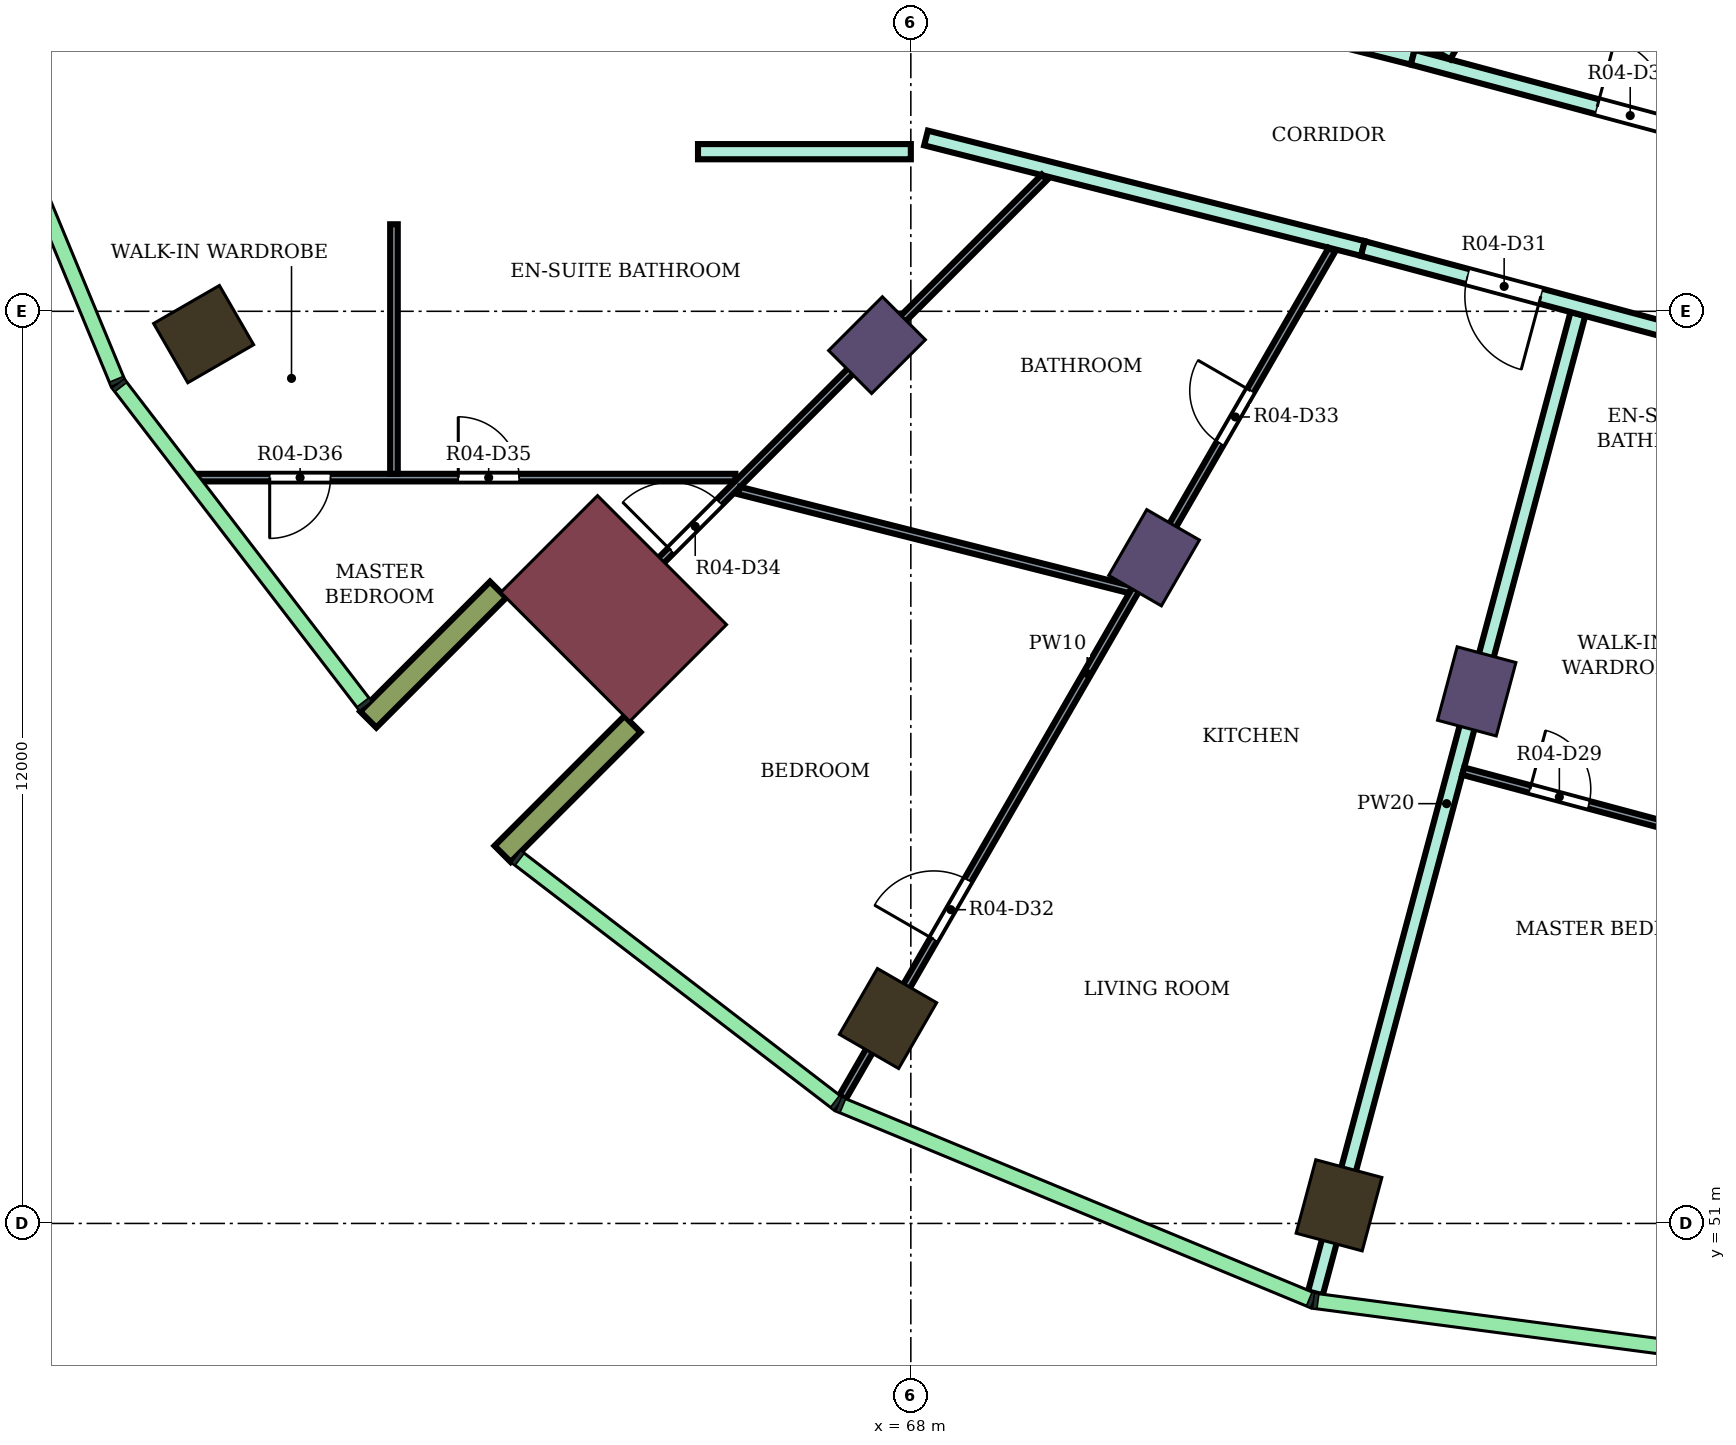
"""IFC4 building model, lengths in metres.
Left out: names, types, materials, properties, quantities, classifications, styles, units other than length and angle.
Written with IfcOpenShell. Run it as: python <this file> out.ifc"""

import sys

from ifc_helpers import new_model, si_unit, direction, frame, frame_2d, origin, origin_2d, place, context, subcontext, project, spatial, rectangle, extrude, element, fill, save


model = new_model("IFC4")
c1 = context("Model", 3, precision=1e-05, world=origin(), true_north=direction((0.0, 1.0)))
c2 = subcontext(c1, "Body", "Model", "MODEL_VIEW")
j1 = project(units=[si_unit("LENGTHUNIT", "METRE"), si_unit("PLANEANGLEUNIT", "RADIAN")], contexts=[c1])
p1 = place(None, origin())
s1 = spatial("IfcSite", under=j1, at=p1, CompositionType="ELEMENT")
p2 = place(p1, origin())
s2 = spatial("IfcBuilding", under=s1, at=p2, CompositionType="ELEMENT")
p3 = place(p2, frame((0.0, 0.0, 194.6)))
s3 = spatial("IfcBuildingStorey", under=s2, at=p3, CompositionType="ELEMENT", Elevation=194.6)
for number, where, z_axis, x_axis in (
    (1, (58.696, 62.7, 0.0), (0.0, 0.0, 1.0), (-0.866, -0.5, 0.0)),
    (2, (67.7, 53.696, 0.0), (0.0, 0.0, 1.0), (-0.5, -0.866, 0.0)),
    (3, (73.633, 51.238, 0.0), (0.0, 0.0, 1.0), (-0.259, -0.966, 0.0)),
):
    element("IfcColumn", number, at=place(p3, frame(where, z_axis=z_axis, x_axis=x_axis)), inside=s3, PredefinedType="COLUMN", context=c2, shape_type="SweptSolid", body=[
        extrude(rectangle(XDim=1.0, YDim=0.9, at=origin_2d()), origin(), (0.0, 0.0, 1.0), 4.1),
    ])
for number, where, z_axis, x_axis in (
    (4, (67.555, 62.555, 0.0), (0.0, 0.0, 1.0), (-0.707, -0.707, 0.0)),
    (5, (71.2, 59.758, 0.0), (0.0, 0.0, 1.0), (-0.5, -0.866, 0.0)),
    (6, (75.445, 58.0, 0.0), (0.0, 0.0, 1.0), (-0.259, -0.966, 0.0)),
):
    element("IfcColumn", number, at=place(p3, frame(where, z_axis=z_axis, x_axis=x_axis)), inside=s3, PredefinedType="COLUMN", context=c2, shape_type="SweptSolid", body=[
        extrude(rectangle(XDim=1.0, YDim=0.8, at=origin_2d()), origin(), (0.0, 0.0, 1.0), 4.1),
    ])
p4 = place(p3, frame((64.09, 59.09, 0.0), z_axis=(0.0, 0.0, 1.0), x_axis=(-0.707106781187, -0.707106781187, 0.0)))
e7 = element("IfcColumn", 7, at=p4, inside=s3, PredefinedType="COLUMN", context=c2, shape_type="SweptSolid", body=[
    extrude(rectangle(XDim=1.8, YDim=2.4, at=origin_2d()), origin(), (0.0, 0.0, 1.0), 4.1),
])
for number, where, z_axis, x_axis in (
    (8, (62.57, 59.338, 0.0), (0.0, 0.0, 1.0), (-0.707, -0.707, 0.0)),
    (9, (64.338, 57.57, 0.0), (0.0, 0.0, 1.0), (-0.707, -0.707, 0.0)),
):
    element("IfcWall", number, at=place(p3, frame(where, z_axis=z_axis, x_axis=x_axis)), inside=s3, PredefinedType="NOTDEFINED", context=c2, shape_type="SweptSolid", body=[
        extrude(rectangle(XDim=2.416, YDim=0.3, at=frame_2d((1.208, 0.0))), origin(), (0.0, 0.0, 1.0), 4.1),
    ])
p5 = place(p3, frame((65.2, 65.1, 0.0), z_axis=(0.0, 0.0, 1.0), x_axis=(1.0, 0.0, 0.0)))
e10 = element("IfcWall", 10, at=p5, inside=s3, PredefinedType="PARTITIONING", context=c2, shape_type="SweptSolid", body=[
    extrude(rectangle(XDim=2.8, YDim=0.2, at=frame_2d((1.4, 0.0))), origin(), (0.0, 0.0, 1.0), 3.65),
])
p6 = place(p3, frame((68.2, 65.28, 0.0), z_axis=(0.0, 0.0, 1.0), x_axis=(0.969450596516, -0.245286650503, 0.0)))
e11 = element("IfcWall", 11, at=p6, inside=s3, PredefinedType="PARTITIONING", context=c2, shape_type="SweptSolid", body=[
    extrude(rectangle(XDim=5.928, YDim=0.2, at=frame_2d((2.964, 0.0))), origin(), (0.0, 0.0, 1.0), 3.65),
])
p7 = place(p3, frame((72.1, 66.975, 0.0), z_axis=(0.0, 0.0, 1.0), x_axis=(0.969471314457, -0.245204752086, 0.0)))
e12 = element("IfcWall", 12, at=p7, inside=s3, PredefinedType="PARTITIONING", context=c2, shape_type="SweptSolid", body=[
    extrude(rectangle(XDim=2.582, YDim=0.2, at=frame_2d((1.291, 0.0))), origin(), (0.0, 0.0, 1.0), 3.65),
])
p8 = place(p7, frame((0.841, 0.0, 0.0)))
e13 = element("IfcOpeningElement", 13, at=p8, cuts=e12, PredefinedType="OPENING", context=c2, shape_type="SweptSolid", body=[
    extrude(rectangle(XDim=0.9, YDim=2.1, at=frame_2d((0.45, 1.05))), frame((0.0, 0.11, 0.0), z_axis=(0.0, -1.0, 0.0), x_axis=(1.0, 0.0, 0.0)), (0.0, 0.0, 1.0), 0.22),
])
p9 = place(p3, frame((73.323, 50.081, 0.0), z_axis=(0.0, 0.0, 1.0), x_axis=(0.258888262922, 0.965907276772, 0.0)))
e14 = element("IfcWall", 14, at=p9, inside=s3, PredefinedType="PARTITIONING", context=c2, shape_type="SweptSolid", body=[
    extrude(rectangle(XDim=13.338, YDim=0.2, at=frame_2d((6.669, 0.0))), origin(), (0.0, 0.0, 1.0), 3.65),
])
p10 = place(p3, frame((73.947, 63.826, 0.0), z_axis=(0.0, 0.0, 1.0), x_axis=(0.965908253407, -0.258884619088, 0.0)))
e15 = element("IfcWall", 15, at=p10, inside=s3, PredefinedType="PARTITIONING", context=c2, shape_type="SweptSolid", body=[
    extrude(rectangle(XDim=6.217, YDim=0.2, at=frame_2d((3.108, 0.0))), origin(), (0.0, 0.0, 1.0), 3.65),
])
p11 = place(p10, frame((1.424, 0.0, 0.0)))
e16 = element("IfcOpeningElement", 16, at=p11, cuts=e15, PredefinedType="OPENING", context=c2, shape_type="SweptSolid", body=[
    extrude(rectangle(XDim=1.0, YDim=2.1, at=frame_2d((0.5, 1.05))), frame((0.0, 0.11, 0.0), z_axis=(0.0, -1.0, 0.0), x_axis=(1.0, 0.0, 0.0)), (0.0, 0.0, 1.0), 0.22),
])
p12 = place(p3, frame((74.603, 66.342, 0.0), z_axis=(0.0, 0.0, 1.0), x_axis=(0.965920893652, -0.258837453254, 0.0)))
e17 = element("IfcWall", 17, at=p12, inside=s3, PredefinedType="PARTITIONING", context=c2, shape_type="SweptSolid", body=[
    extrude(rectangle(XDim=5.458, YDim=0.2, at=frame_2d((2.729, 0.0))), origin(), (0.0, 0.0, 1.0), 3.65),
])
p13 = place(p12, frame((2.512, 0.0, 0.0)))
e18 = element("IfcOpeningElement", 18, at=p13, cuts=e17, PredefinedType="OPENING", context=c2, shape_type="SweptSolid", body=[
    extrude(rectangle(XDim=0.9, YDim=2.1, at=frame_2d((0.45, 1.05))), frame((0.0, 0.11, 0.0), z_axis=(0.0, -1.0, 0.0), x_axis=(1.0, 0.0, 0.0)), (0.0, 0.0, 1.0), 0.22),
])
p14 = place(p3, frame((75.01, 66.364, 0.0), z_axis=(0.0, 0.0, 1.0), x_axis=(0.500097042406, 0.865969369075, 0.0)))
e19 = element("IfcWall", 19, at=p14, inside=s3, PredefinedType="PARTITIONING", context=c2, shape_type="SweptSolid", body=[
    extrude(rectangle(XDim=2.275, YDim=0.2, at=frame_2d((1.138, 0.0))), origin(), (0.0, 0.0, 1.0), 3.65),
])
p15 = place(p3, frame((58.6, 60.812, 0.0), z_axis=(0.0, 0.0, 1.0), x_axis=(1.0, 0.0, 0.0)))
e20 = element("IfcWall", 20, at=p15, inside=s3, PredefinedType="PARTITIONING", context=c2, shape_type="SweptSolid", body=[
    extrude(rectangle(XDim=7.092, YDim=0.1, at=frame_2d((3.546, 0.0))), origin(), (0.0, 0.0, 1.0), 3.65),
])
p16 = place(p15, frame((3.446, 0.0, 0.0)))
e21 = element("IfcOpeningElement", 21, at=p16, cuts=e20, PredefinedType="OPENING", context=c2, shape_type="SweptSolid", body=[
    extrude(rectangle(XDim=0.8, YDim=2.1, at=frame_2d((0.4, 1.05))), frame((0.0, 0.06, 0.0), z_axis=(0.0, -1.0, 0.0), x_axis=(1.0, 0.0, 0.0)), (0.0, 0.0, 1.0), 0.12),
])
p17 = place(p15, frame((0.965, 0.0, 0.0)))
e22 = element("IfcOpeningElement", 22, at=p17, cuts=e20, PredefinedType="OPENING", context=c2, shape_type="SweptSolid", body=[
    extrude(rectangle(XDim=0.8, YDim=2.1, at=frame_2d((0.4, 1.05))), frame((0.0, 0.06, 0.0), z_axis=(0.0, -1.0, 0.0), x_axis=(1.0, 0.0, 0.0)), (0.0, 0.0, 1.0), 0.12),
])
p18 = place(p3, frame((61.2, 60.862, 0.0), z_axis=(0.0, 0.0, 1.0), x_axis=(0.0, 1.0, 0.0)))
e23 = element("IfcWall", 23, at=p18, inside=s3, PredefinedType="PARTITIONING", context=c2, shape_type="SweptSolid", body=[
    extrude(rectangle(XDim=3.283, YDim=0.1, at=frame_2d((1.642, 0.0))), origin(), (0.0, 0.0, 1.0), 3.65),
])
p19 = place(p3, frame((63.592, 58.6, 0.0), z_axis=(0.0, 0.0, 1.0), x_axis=(0.707260766325, 0.706952762508, 0.0)))
e24 = element("IfcWall", 24, at=p19, inside=s3, PredefinedType="PARTITIONING", context=c2, shape_type="SweptSolid", body=[
    extrude(rectangle(XDim=8.719, YDim=0.1, at=frame_2d((4.36, 0.0))), origin(), (0.0, 0.0, 1.0), 3.65),
])
p20 = place(p19, frame((1.772, 0.0, 0.0)))
e25 = element("IfcOpeningElement", 25, at=p20, cuts=e24, PredefinedType="OPENING", context=c2, shape_type="SweptSolid", body=[
    extrude(rectangle(XDim=0.9, YDim=2.1, at=frame_2d((0.45, 1.05))), frame((0.0, 0.06, 0.0), z_axis=(0.0, -1.0, 0.0), x_axis=(1.0, 0.0, 0.0)), (0.0, 0.0, 1.0), 0.12),
])
p21 = place(p3, frame((65.74, 60.642, 0.0), z_axis=(0.0, 0.0, 1.0), x_axis=(0.969435742918, -0.245345349156, 0.0)))
e26 = element("IfcWall", 26, at=p21, inside=s3, PredefinedType="PARTITIONING", context=c2, shape_type="SweptSolid", body=[
    extrude(rectangle(XDim=5.314, YDim=0.1, at=frame_2d((2.657, 0.0))), origin(), (0.0, 0.0, 1.0), 3.65),
])
p22 = place(p3, frame((67.101, 52.659, 0.0), z_axis=(0.0, 0.0, 1.0), x_axis=(0.500035926033, 0.866004660886, 0.0)))
e27 = element("IfcWall", 27, at=p22, inside=s3, PredefinedType="PARTITIONING", context=c2, shape_type="SweptSolid", body=[
    extrude(rectangle(XDim=12.876, YDim=0.1, at=frame_2d((6.438, 0.0))), origin(), (0.0, 0.0, 1.0), 3.65),
])
p23 = place(p22, frame((2.401, 0.0, 0.0)))
e28 = element("IfcOpeningElement", 28, at=p23, cuts=e27, PredefinedType="OPENING", context=c2, shape_type="SweptSolid", body=[
    extrude(rectangle(XDim=0.9, YDim=2.1, at=frame_2d((0.45, 1.05))), frame((0.0, 0.06, 0.0), z_axis=(0.0, -1.0, 0.0), x_axis=(1.0, 0.0, 0.0)), (0.0, 0.0, 1.0), 0.12),
])
p24 = place(p22, frame((9.936, 0.0, 0.0)))
e29 = element("IfcOpeningElement", 29, at=p24, cuts=e27, PredefinedType="OPENING", context=c2, shape_type="SweptSolid", body=[
    extrude(rectangle(XDim=0.8, YDim=2.1, at=frame_2d((0.4, 1.05))), frame((0.0, 0.06, 0.0), z_axis=(0.0, -1.0, 0.0), x_axis=(1.0, 0.0, 0.0)), (0.0, 0.0, 1.0), 0.12),
])
p25 = place(p3, frame((75.267, 56.95, 0.0), z_axis=(0.0, 0.0, 1.0), x_axis=(0.965900084933, -0.25891509405, 0.0)))
e30 = element("IfcWall", 30, at=p25, inside=s3, PredefinedType="PARTITIONING", context=c2, shape_type="SweptSolid", body=[
    extrude(rectangle(XDim=4.84, YDim=0.1, at=frame_2d((2.42, 0.0))), origin(), (0.0, 0.0, 1.0), 3.65),
])
p26 = place(p25, frame((0.91, 0.0, 0.0)))
e31 = element("IfcOpeningElement", 31, at=p26, cuts=e30, PredefinedType="OPENING", context=c2, shape_type="SweptSolid", body=[
    extrude(rectangle(XDim=0.8, YDim=2.1, at=frame_2d((0.4, 1.05))), frame((0.0, 0.06, 0.0), z_axis=(0.0, -1.0, 0.0), x_axis=(1.0, 0.0, 0.0)), (0.0, 0.0, 1.0), 0.12),
])
p27 = place(p25, frame((3.24, 0.0, 0.0)))
e32 = element("IfcOpeningElement", 32, at=p27, cuts=e30, PredefinedType="OPENING", context=c2, shape_type="SweptSolid", body=[
    extrude(rectangle(XDim=0.8, YDim=2.1, at=frame_2d((0.4, 1.05))), frame((0.0, 0.06, 0.0), z_axis=(0.0, -1.0, 0.0), x_axis=(1.0, 0.0, 0.0)), (0.0, 0.0, 1.0), 0.12),
])
p28 = place(p26, origin())
e33 = element("IfcDoor", 33, at=p28, inside=s3, OperationType="SINGLE_SWING_LEFT", PredefinedType="DOOR", context=c2, shape_type="SweptSolid", body=[
    extrude(rectangle(XDim=0.8, YDim=2.1, at=frame_2d((0.4, 1.05))), frame((0.0, 0.025, 0.0), z_axis=(0.0, -1.0, 0.0), x_axis=(1.0, 0.0, 0.0)), (0.0, 0.0, 1.0), 0.05),
])
fill(e31, e33)
p29 = place(p11, frame((1.0, 0.0, 0.0), z_axis=(0.0, 0.0, 1.0), x_axis=(-1.0, 0.0, 0.0)))
e34 = element("IfcDoor", 34, at=p29, inside=s3, OperationType="SINGLE_SWING_LEFT", PredefinedType="DOOR", context=c2, shape_type="SweptSolid", body=[
    extrude(rectangle(XDim=1.0, YDim=2.1, at=frame_2d((0.5, 1.05))), frame((0.0, 0.025, 0.0), z_axis=(0.0, -1.0, 0.0), x_axis=(1.0, 0.0, 0.0)), (0.0, 0.0, 1.0), 0.05),
])
fill(e16, e34)
p30 = place(p23, origin())
e35 = element("IfcDoor", 35, at=p30, inside=s3, OperationType="SINGLE_SWING_LEFT", PredefinedType="DOOR", context=c2, shape_type="SweptSolid", body=[
    extrude(rectangle(XDim=0.9, YDim=2.1, at=frame_2d((0.45, 1.05))), frame((0.0, 0.025, 0.0), z_axis=(0.0, -1.0, 0.0), x_axis=(1.0, 0.0, 0.0)), (0.0, 0.0, 1.0), 0.05),
])
fill(e28, e35)
p31 = place(p24, origin())
e36 = element("IfcDoor", 36, at=p31, inside=s3, OperationType="SINGLE_SWING_RIGHT", PredefinedType="DOOR", context=c2, shape_type="SweptSolid", body=[
    extrude(rectangle(XDim=0.8, YDim=2.1, at=frame_2d((0.4, 1.05))), frame((0.0, 0.025, 0.0), z_axis=(0.0, -1.0, 0.0), x_axis=(1.0, 0.0, 0.0)), (0.0, 0.0, 1.0), 0.05),
])
fill(e29, e36)
p32 = place(p20, origin())
e37 = element("IfcDoor", 37, at=p32, inside=s3, OperationType="SINGLE_SWING_LEFT", PredefinedType="DOOR", context=c2, shape_type="SweptSolid", body=[
    extrude(rectangle(XDim=0.9, YDim=2.1, at=frame_2d((0.45, 1.05))), frame((0.0, 0.025, 0.0), z_axis=(0.0, -1.0, 0.0), x_axis=(1.0, 0.0, 0.0)), (0.0, 0.0, 1.0), 0.05),
])
fill(e25, e37)
p33 = place(p16, origin())
e38 = element("IfcDoor", 38, at=p33, inside=s3, OperationType="SINGLE_SWING_LEFT", PredefinedType="DOOR", context=c2, shape_type="SweptSolid", body=[
    extrude(rectangle(XDim=0.8, YDim=2.1, at=frame_2d((0.4, 1.05))), frame((0.0, 0.025, 0.0), z_axis=(0.0, -1.0, 0.0), x_axis=(1.0, 0.0, 0.0)), (0.0, 0.0, 1.0), 0.05),
])
fill(e21, e38)
p34 = place(p17, frame((0.8, 0.0, 0.0), z_axis=(0.0, 0.0, 1.0), x_axis=(-1.0, 0.0, 0.0)))
e39 = element("IfcDoor", 39, at=p34, inside=s3, OperationType="SINGLE_SWING_RIGHT", PredefinedType="DOOR", context=c2, shape_type="SweptSolid", body=[
    extrude(rectangle(XDim=0.8, YDim=2.1, at=frame_2d((0.4, 1.05))), frame((0.0, 0.025, 0.0), z_axis=(0.0, -1.0, 0.0), x_axis=(1.0, 0.0, 0.0)), (0.0, 0.0, 1.0), 0.05),
])
fill(e22, e39)
p35 = place(p13, origin())
e40 = element("IfcDoor", 40, at=p35, inside=s3, OperationType="SINGLE_SWING_LEFT", PredefinedType="DOOR", context=c2, shape_type="SweptSolid", body=[
    extrude(rectangle(XDim=0.9, YDim=2.1, at=frame_2d((0.45, 1.05))), frame((0.0, 0.025, 0.0), z_axis=(0.0, -1.0, 0.0), x_axis=(1.0, 0.0, 0.0)), (0.0, 0.0, 1.0), 0.05),
])
fill(e18, e40)
save(model, sys.argv[1])
